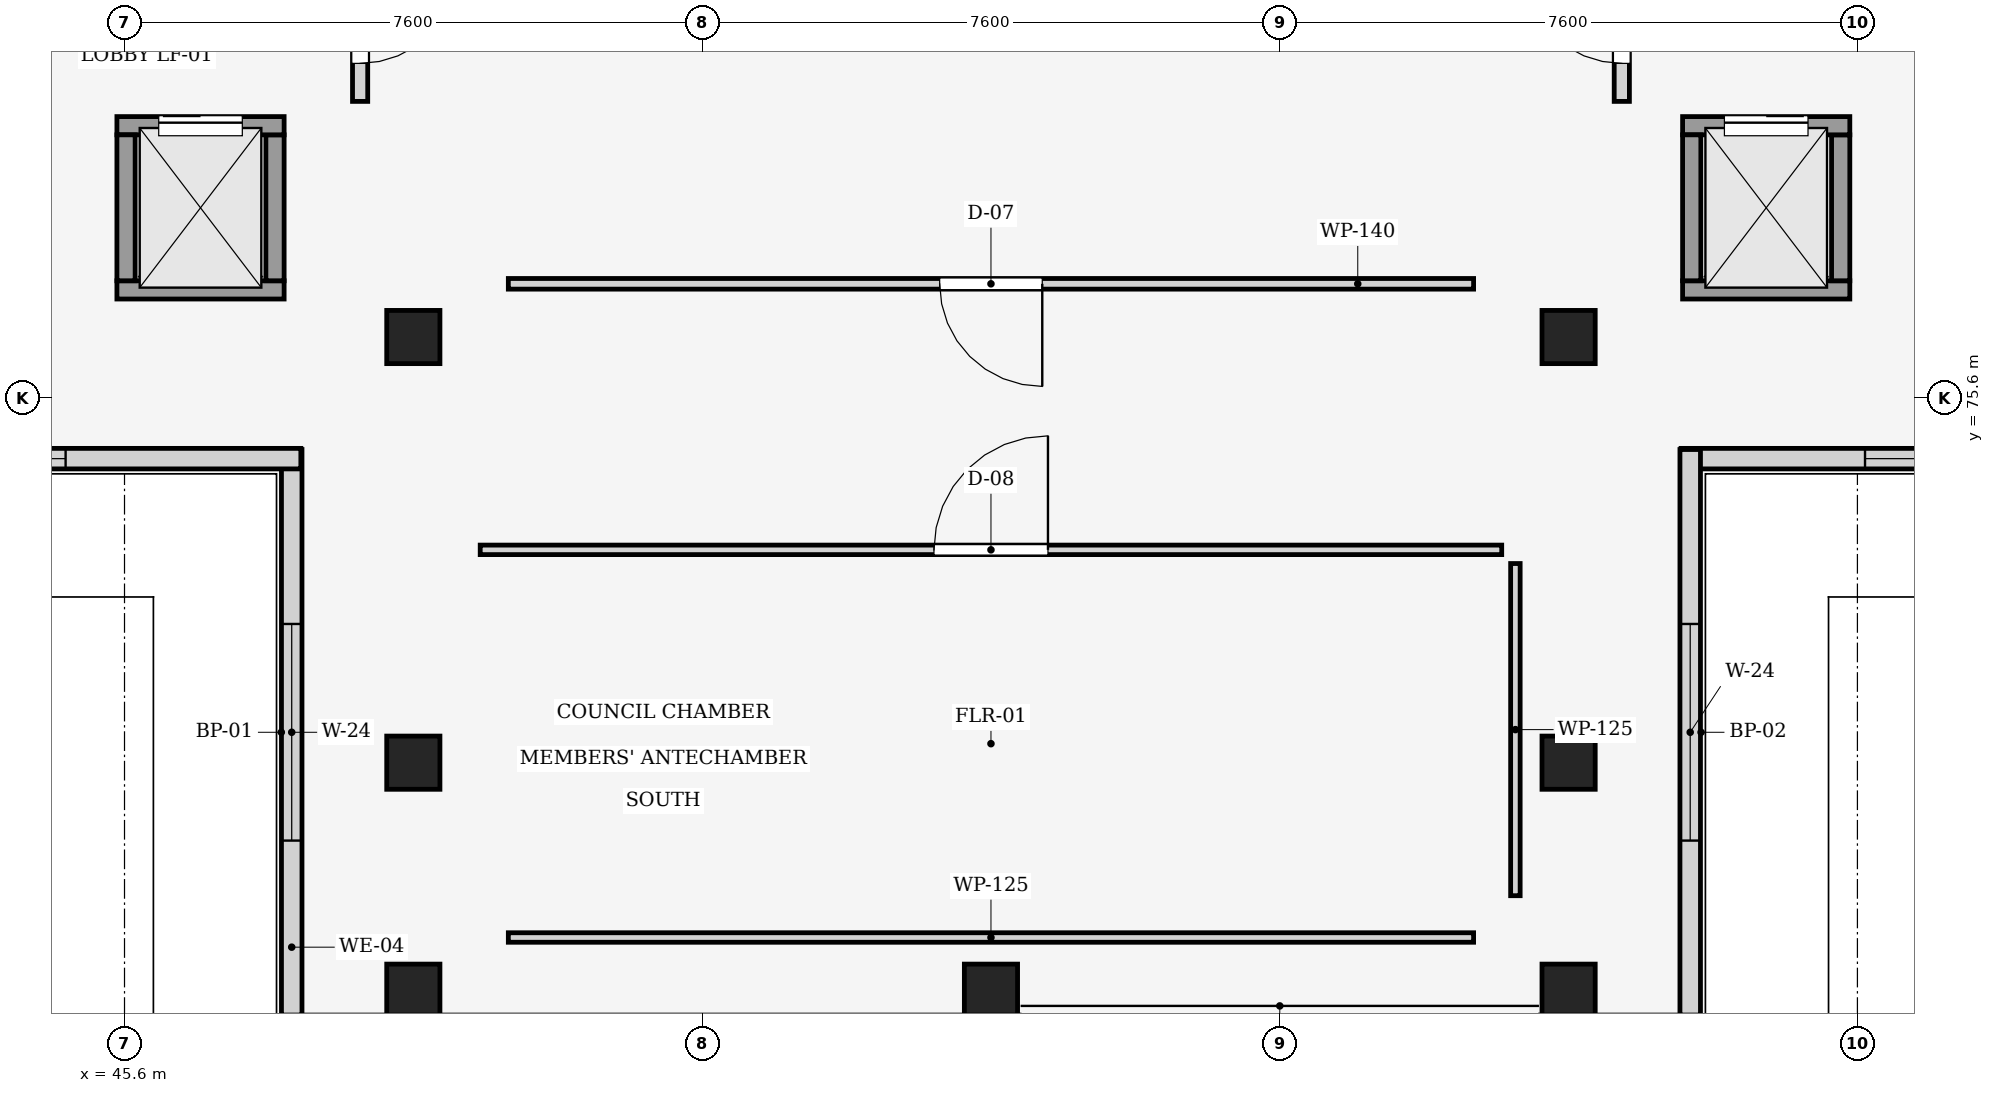
"""IFC4 building model, lengths in metres.
Left out: names, types, materials, properties, quantities, classifications, styles, units other than length and angle.
Written with IfcOpenShell. Run it as: python <this file> out.ifc"""

import sys

from ifc_helpers import new_model, si_unit, direction, frame, frame_2d, origin, origin_2d, place, context, subcontext, project, spatial, rectangle, extrude, element, fill, save


model = new_model("IFC4")
c1 = context("Model", 3, precision=1e-05, world=origin(), true_north=direction((0.0, 1.0)))
c2 = subcontext(c1, "Body", "Model", "MODEL_VIEW")
j1 = project(units=[si_unit("LENGTHUNIT", "METRE"), si_unit("PLANEANGLEUNIT", "RADIAN")], contexts=[c1])
p1 = place(None, origin())
s1 = spatial("IfcSite", under=j1, at=p1, CompositionType="ELEMENT")
p2 = place(p1, origin())
s2 = spatial("IfcBuilding", under=s1, at=p2, CompositionType="ELEMENT")
p3 = place(p2, frame((0.0, 0.0, 21.3)))
s3 = spatial("IfcBuildingStorey", under=s2, at=p3, CompositionType="ELEMENT", Elevation=21.3)
for number, where, z_axis, x_axis in (
    (1, (49.4, 70.8, 0.0), (0.0, 0.0, 1.0), (1.0, 0.0, 0.0)),
    (2, (49.4, 76.4, 0.0), (0.0, 0.0, 1.0), (1.0, 0.0, 0.0)),
    (3, (64.6, 70.8, 0.0), (0.0, 0.0, 1.0), (1.0, 0.0, 0.0)),
    (4, (64.6, 76.4, 0.0), (0.0, 0.0, 1.0), (1.0, 0.0, 0.0)),
    (5, (49.4, 67.8, 0.0), (0.0, 0.0, 1.0), (1.0, 0.0, 0.0)),
    (6, (57.0, 67.8, 0.0), (0.0, 0.0, 1.0), (1.0, 0.0, 0.0)),
    (7, (64.6, 67.8, 0.0), (0.0, 0.0, 1.0), (1.0, 0.0, 0.0)),
):
    element("IfcColumn", number, at=place(p3, frame(where, z_axis=z_axis, x_axis=x_axis)), inside=s3, PredefinedType="COLUMN", context=c2, shape_type="SweptSolid", body=[
        extrude(rectangle(XDim=0.7, YDim=0.7, at=origin_2d()), origin(), (0.0, 0.0, 1.0), 4.05),
    ])
p4 = place(p3, frame((47.8, 67.48, 0.0), z_axis=(0.0, 0.0, 1.0), x_axis=(0.0, 1.0, 0.0)))
e8 = element("IfcWall", 8, at=p4, inside=s3, PredefinedType="STANDARD", context=c2, shape_type="SweptSolid", body=[
    extrude(rectangle(XDim=7.44, YDim=0.27, at=frame_2d((3.72, 0.0))), origin(), (0.0, 0.0, 1.0), 3.015),
])
p5 = place(p4, frame((2.295, 0.0, 0.85)))
e9 = element("IfcOpeningElement", 9, at=p5, cuts=e8, PredefinedType="OPENING", context=c2, shape_type="SweptSolid", body=[
    extrude(rectangle(XDim=2.85, YDim=1.65, at=frame_2d((1.425, 0.825))), frame((0.0, 0.145, 0.0), z_axis=(0.0, -1.0, 0.0), x_axis=(1.0, 0.0, 0.0)), (0.0, 0.0, 1.0), 0.29),
])
p6 = place(p3, frame((47.92, 74.8, 0.0), z_axis=(0.0, 0.0, 1.0), x_axis=(-1.0, 0.0, 0.0)))
e10 = element("IfcWall", 10, at=p6, inside=s3, PredefinedType="STANDARD", context=c2, shape_type="SweptSolid", body=[
    extrude(rectangle(XDim=7.44, YDim=0.27, at=frame_2d((3.72, 0.0))), origin(), (0.0, 0.0, 1.0), 3.015),
])
p7 = place(p6, frame((3.095, 0.0, 0.85)))
e11 = element("IfcOpeningElement", 11, at=p7, cuts=e10, PredefinedType="OPENING", context=c2, shape_type="SweptSolid", body=[
    extrude(rectangle(XDim=1.25, YDim=1.85, at=frame_2d((0.625, 0.925))), frame((0.0, 0.145, 0.0), z_axis=(0.0, -1.0, 0.0), x_axis=(1.0, 0.0, 0.0)), (0.0, 0.0, 1.0), 0.29),
])
p8 = place(p3, frame((73.52, 74.8, 0.0), z_axis=(0.0, 0.0, 1.0), x_axis=(-1.0, 0.0, 0.0)))
e12 = element("IfcWall", 12, at=p8, inside=s3, PredefinedType="STANDARD", context=c2, shape_type="SweptSolid", body=[
    extrude(rectangle(XDim=7.44, YDim=0.27, at=frame_2d((3.72, 0.0))), origin(), (0.0, 0.0, 1.0), 3.015),
])
p9 = place(p8, frame((2.42, 0.0, 0.85)))
e13 = element("IfcOpeningElement", 13, at=p9, cuts=e12, PredefinedType="OPENING", context=c2, shape_type="SweptSolid", body=[
    extrude(rectangle(XDim=2.6, YDim=1.65, at=frame_2d((1.3, 0.825))), frame((0.0, 0.145, 0.0), z_axis=(0.0, -1.0, 0.0), x_axis=(1.0, 0.0, 0.0)), (0.0, 0.0, 1.0), 0.29),
])
p10 = place(p3, frame((66.2, 74.92, 0.0), z_axis=(0.0, 0.0, 1.0), x_axis=(0.0, -1.0, 0.0)))
e14 = element("IfcWall", 14, at=p10, inside=s3, PredefinedType="STANDARD", context=c2, shape_type="SweptSolid", body=[
    extrude(rectangle(XDim=7.44, YDim=0.27, at=frame_2d((3.72, 0.0))), origin(), (0.0, 0.0, 1.0), 3.015),
])
p11 = place(p10, frame((2.295, 0.0, 0.85)))
e15 = element("IfcOpeningElement", 15, at=p11, cuts=e14, PredefinedType="OPENING", context=c2, shape_type="SweptSolid", body=[
    extrude(rectangle(XDim=2.85, YDim=1.65, at=frame_2d((1.425, 0.825))), frame((0.0, 0.145, 0.0), z_axis=(0.0, -1.0, 0.0), x_axis=(1.0, 0.0, 0.0)), (0.0, 0.0, 1.0), 0.29),
])
p12 = place(p3, frame((47.7, 77.02, 0.0), z_axis=(0.0, 0.0, 1.0), x_axis=(-1.0, 0.0, 0.0)))
e16 = element("IfcWall", 16, at=p12, inside=s3, PredefinedType="SHEAR", context=c2, shape_type="SweptSolid", body=[
    extrude(rectangle(XDim=2.2, YDim=0.24, at=frame_2d((1.1, 0.0))), origin(), (0.0, 0.0, 1.0), 4.05),
])
p13 = place(p3, frame((47.58, 79.06, 0.0), z_axis=(0.0, 0.0, 1.0), x_axis=(0.0, -1.0, 0.0)))
e17 = element("IfcWall", 17, at=p13, inside=s3, PredefinedType="SHEAR", context=c2, shape_type="SweptSolid", body=[
    extrude(rectangle(XDim=1.92, YDim=0.24, at=frame_2d((0.96, 0.0))), origin(), (0.0, 0.0, 1.0), 4.05),
])
p14 = place(p3, frame((45.5, 79.18, 0.0), z_axis=(0.0, 0.0, 1.0), x_axis=(1.0, 0.0, 0.0)))
e18 = element("IfcWall", 18, at=p14, inside=s3, PredefinedType="SHEAR", context=c2, shape_type="SweptSolid", body=[
    extrude(rectangle(XDim=2.2, YDim=0.24, at=frame_2d((1.1, 0.0))), origin(), (0.0, 0.0, 1.0), 4.05),
])
p15 = place(p14, frame((0.55, 0.0, 0.0)))
e19 = element("IfcOpeningElement", 19, at=p15, cuts=e18, PredefinedType="OPENING", context=c2, shape_type="SweptSolid", body=[
    extrude(rectangle(XDim=1.1, YDim=2.15, at=frame_2d((0.55, 1.075))), frame((0.0, 0.13, 0.0), z_axis=(0.0, -1.0, 0.0), x_axis=(1.0, 0.0, 0.0)), (0.0, 0.0, 1.0), 0.26),
])
p16 = place(p3, frame((45.62, 77.14, 0.0), z_axis=(0.0, 0.0, 1.0), x_axis=(0.0, 1.0, 0.0)))
e20 = element("IfcWall", 20, at=p16, inside=s3, PredefinedType="SHEAR", context=c2, shape_type="SweptSolid", body=[
    extrude(rectangle(XDim=1.92, YDim=0.24, at=frame_2d((0.96, 0.0))), origin(), (0.0, 0.0, 1.0), 4.05),
])
p17 = place(p3, frame((48.7, 81.8, 0.0), z_axis=(0.0, 0.0, 1.0), x_axis=(0.0, -1.0, 0.0)))
e21 = element("IfcWall", 21, at=p17, inside=s3, PredefinedType="PARTITIONING", context=c2, shape_type="SweptSolid", body=[
    extrude(rectangle(XDim=2.3, YDim=0.2, at=frame_2d((1.15, 0.0))), origin(), (0.0, 0.0, 1.0), 2.9),
])
p18 = place(p17, frame((0.5, 0.0, 0.0)))
e22 = element("IfcOpeningElement", 22, at=p18, cuts=e21, PredefinedType="OPENING", context=c2, shape_type="SweptSolid", body=[
    extrude(rectangle(XDim=1.3, YDim=2.2, at=frame_2d((0.65, 1.1))), frame((0.0, 0.11, 0.0), z_axis=(0.0, -1.0, 0.0), x_axis=(1.0, 0.0, 0.0)), (0.0, 0.0, 1.0), 0.22),
])
p19 = place(p3, frame((68.3, 77.02, 0.0), z_axis=(0.0, 0.0, 1.0), x_axis=(-1.0, 0.0, 0.0)))
e23 = element("IfcWall", 23, at=p19, inside=s3, PredefinedType="SHEAR", context=c2, shape_type="SweptSolid", body=[
    extrude(rectangle(XDim=2.2, YDim=0.24, at=frame_2d((1.1, 0.0))), origin(), (0.0, 0.0, 1.0), 4.05),
])
p20 = place(p3, frame((68.18, 79.06, 0.0), z_axis=(0.0, 0.0, 1.0), x_axis=(0.0, -1.0, 0.0)))
e24 = element("IfcWall", 24, at=p20, inside=s3, PredefinedType="SHEAR", context=c2, shape_type="SweptSolid", body=[
    extrude(rectangle(XDim=1.92, YDim=0.24, at=frame_2d((0.96, 0.0))), origin(), (0.0, 0.0, 1.0), 4.05),
])
p21 = place(p3, frame((66.1, 79.18, 0.0), z_axis=(0.0, 0.0, 1.0), x_axis=(1.0, 0.0, 0.0)))
e25 = element("IfcWall", 25, at=p21, inside=s3, PredefinedType="SHEAR", context=c2, shape_type="SweptSolid", body=[
    extrude(rectangle(XDim=2.2, YDim=0.24, at=frame_2d((1.1, 0.0))), origin(), (0.0, 0.0, 1.0), 4.05),
])
p22 = place(p21, frame((0.55, 0.0, 0.0)))
e26 = element("IfcOpeningElement", 26, at=p22, cuts=e25, PredefinedType="OPENING", context=c2, shape_type="SweptSolid", body=[
    extrude(rectangle(XDim=1.1, YDim=2.15, at=frame_2d((0.55, 1.075))), frame((0.0, 0.13, 0.0), z_axis=(0.0, -1.0, 0.0), x_axis=(1.0, 0.0, 0.0)), (0.0, 0.0, 1.0), 0.26),
])
p23 = place(p3, frame((66.22, 77.14, 0.0), z_axis=(0.0, 0.0, 1.0), x_axis=(0.0, 1.0, 0.0)))
e27 = element("IfcWall", 27, at=p23, inside=s3, PredefinedType="SHEAR", context=c2, shape_type="SweptSolid", body=[
    extrude(rectangle(XDim=1.92, YDim=0.24, at=frame_2d((0.96, 0.0))), origin(), (0.0, 0.0, 1.0), 4.05),
])
p24 = place(p3, frame((65.3, 79.5, 0.0), z_axis=(0.0, 0.0, 1.0), x_axis=(0.0, 1.0, 0.0)))
e28 = element("IfcWall", 28, at=p24, inside=s3, PredefinedType="PARTITIONING", context=c2, shape_type="SweptSolid", body=[
    extrude(rectangle(XDim=2.3, YDim=0.2, at=frame_2d((1.15, 0.0))), origin(), (0.0, 0.0, 1.0), 2.9),
])
p25 = place(p24, frame((0.5, 0.0, 0.0)))
e29 = element("IfcOpeningElement", 29, at=p25, cuts=e28, PredefinedType="OPENING", context=c2, shape_type="SweptSolid", body=[
    extrude(rectangle(XDim=1.3, YDim=2.2, at=frame_2d((0.65, 1.1))), frame((0.0, 0.11, 0.0), z_axis=(0.0, -1.0, 0.0), x_axis=(1.0, 0.0, 0.0)), (0.0, 0.0, 1.0), 0.22),
])
p26 = place(p3, frame((63.35, 77.1, 0.0), z_axis=(0.0, 0.0, 1.0), x_axis=(-1.0, 0.0, 0.0)))
e30 = element("IfcWall", 30, at=p26, inside=s3, PredefinedType="PARTITIONING", context=c2, shape_type="SweptSolid", body=[
    extrude(rectangle(XDim=12.7, YDim=0.14, at=frame_2d((6.35, 0.0))), origin(), (0.0, 0.0, 1.0), 3.7),
])
p27 = place(p26, frame((5.675, 0.0, 0.0)))
e31 = element("IfcOpeningElement", 31, at=p27, cuts=e30, PredefinedType="OPENING", context=c2, shape_type="SweptSolid", body=[
    extrude(rectangle(XDim=1.35, YDim=2.1, at=frame_2d((0.675, 1.05))), frame((0.0, 0.08, 0.0), z_axis=(0.0, -1.0, 0.0), x_axis=(1.0, 0.0, 0.0)), (0.0, 0.0, 1.0), 0.16),
])
p28 = place(p3, frame((50.28, 73.6, 0.0), z_axis=(0.0, 0.0, 1.0), x_axis=(1.0, 0.0, 0.0)))
e32 = element("IfcWall", 32, at=p28, inside=s3, PredefinedType="PARTITIONING", context=c2, shape_type="SweptSolid", body=[
    extrude(rectangle(XDim=13.44, YDim=0.125, at=frame_2d((6.72, 0.0))), origin(), (0.0, 0.0, 1.0), 3.7),
])
p29 = place(p28, frame((5.97, 0.0, 0.0)))
e33 = element("IfcOpeningElement", 33, at=p29, cuts=e32, PredefinedType="OPENING", context=c2, shape_type="SweptSolid", body=[
    extrude(rectangle(XDim=1.5, YDim=2.1, at=frame_2d((0.75, 1.05))), frame((0.0, 0.073, 0.0), z_axis=(0.0, -1.0, 0.0), x_axis=(1.0, 0.0, 0.0)), (0.0, 0.0, 1.0), 0.145),
])
p30 = place(p3, frame((63.35, 68.5, 0.0), z_axis=(0.0, 0.0, 1.0), x_axis=(-1.0, 0.0, 0.0)))
e34 = element("IfcWall", 34, at=p30, inside=s3, PredefinedType="PARTITIONING", context=c2, shape_type="SweptSolid", body=[
    extrude(rectangle(XDim=12.7, YDim=0.125, at=frame_2d((6.35, 0.0))), origin(), (0.0, 0.0, 1.0), 3.7),
])
p31 = place(p3, frame((63.9, 73.42, 0.0), z_axis=(0.0, 0.0, 1.0), x_axis=(0.0, -1.0, 0.0)))
e35 = element("IfcWall", 35, at=p31, inside=s3, PredefinedType="PARTITIONING", context=c2, shape_type="SweptSolid", body=[
    extrude(rectangle(XDim=4.37, YDim=0.125, at=frame_2d((2.185, 0.0))), origin(), (0.0, 0.0, 1.0), 3.115),
])
p32 = place(p5, origin())
e36 = element("IfcWindow", 36, at=p32, inside=s3, PartitioningType="SINGLE_PANEL", PredefinedType="WINDOW", context=c2, shape_type="SweptSolid", body=[
    extrude(rectangle(XDim=2.85, YDim=1.65, at=frame_2d((1.425, 0.825))), frame((0.0, 0.03, 0.0), z_axis=(0.0, -1.0, 0.0), x_axis=(1.0, 0.0, 0.0)), (0.0, 0.0, 1.0), 0.06),
])
fill(e9, e36)
p33 = place(p7, origin())
e37 = element("IfcWindow", 37, at=p33, inside=s3, PartitioningType="SINGLE_PANEL", PredefinedType="WINDOW", context=c2, shape_type="SweptSolid", body=[
    extrude(rectangle(XDim=1.25, YDim=1.85, at=frame_2d((0.625, 0.925))), frame((0.0, 0.03, 0.0), z_axis=(0.0, -1.0, 0.0), x_axis=(1.0, 0.0, 0.0)), (0.0, 0.0, 1.0), 0.06),
])
fill(e11, e37)
p34 = place(p9, origin())
e38 = element("IfcWindow", 38, at=p34, inside=s3, PartitioningType="SINGLE_PANEL", PredefinedType="WINDOW", context=c2, shape_type="SweptSolid", body=[
    extrude(rectangle(XDim=2.6, YDim=1.65, at=frame_2d((1.3, 0.825))), frame((0.0, 0.03, 0.0), z_axis=(0.0, -1.0, 0.0), x_axis=(1.0, 0.0, 0.0)), (0.0, 0.0, 1.0), 0.06),
])
fill(e13, e38)
p35 = place(p11, origin())
e39 = element("IfcWindow", 39, at=p35, inside=s3, PartitioningType="SINGLE_PANEL", PredefinedType="WINDOW", context=c2, shape_type="SweptSolid", body=[
    extrude(rectangle(XDim=2.85, YDim=1.65, at=frame_2d((1.425, 0.825))), frame((0.0, 0.03, 0.0), z_axis=(0.0, -1.0, 0.0), x_axis=(1.0, 0.0, 0.0)), (0.0, 0.0, 1.0), 0.06),
])
fill(e15, e39)
p36 = place(p15, origin())
e40 = element("IfcDoor", 40, at=p36, inside=s3, OperationType="SLIDING_TO_LEFT", PredefinedType="DOOR", context=c2, shape_type="SweptSolid", body=[
    extrude(rectangle(XDim=1.1, YDim=2.15, at=frame_2d((0.55, 1.075))), frame((0.0, 0.025, 0.0), z_axis=(0.0, -1.0, 0.0), x_axis=(1.0, 0.0, 0.0)), (0.0, 0.0, 1.0), 0.05),
])
fill(e19, e40)
p37 = place(p18, origin())
e41 = element("IfcDoor", 41, at=p37, inside=s3, OperationType="SINGLE_SWING_LEFT", PredefinedType="DOOR", context=c2, shape_type="SweptSolid", body=[
    extrude(rectangle(XDim=1.3, YDim=2.2, at=frame_2d((0.65, 1.1))), frame((0.0, 0.025, 0.0), z_axis=(0.0, -1.0, 0.0), x_axis=(1.0, 0.0, 0.0)), (0.0, 0.0, 1.0), 0.05),
])
fill(e22, e41)
p38 = place(p22, origin())
e42 = element("IfcDoor", 42, at=p38, inside=s3, OperationType="SLIDING_TO_RIGHT", PredefinedType="DOOR", context=c2, shape_type="SweptSolid", body=[
    extrude(rectangle(XDim=1.1, YDim=2.15, at=frame_2d((0.55, 1.075))), frame((0.0, 0.025, 0.0), z_axis=(0.0, -1.0, 0.0), x_axis=(1.0, 0.0, 0.0)), (0.0, 0.0, 1.0), 0.05),
])
fill(e26, e42)
p39 = place(p25, origin())
e43 = element("IfcDoor", 43, at=p39, inside=s3, OperationType="SINGLE_SWING_RIGHT", PredefinedType="DOOR", context=c2, shape_type="SweptSolid", body=[
    extrude(rectangle(XDim=1.3, YDim=2.2, at=frame_2d((0.65, 1.1))), frame((0.0, 0.025, 0.0), z_axis=(0.0, -1.0, 0.0), x_axis=(1.0, 0.0, 0.0)), (0.0, 0.0, 1.0), 0.05),
])
fill(e29, e43)
p40 = place(p27, origin())
e44 = element("IfcDoor", 44, at=p40, inside=s3, OperationType="SINGLE_SWING_LEFT", PredefinedType="DOOR", context=c2, shape_type="SweptSolid", body=[
    extrude(rectangle(XDim=1.35, YDim=2.1, at=frame_2d((0.675, 1.05))), frame((0.0, 0.025, 0.0), z_axis=(0.0, -1.0, 0.0), x_axis=(1.0, 0.0, 0.0)), (0.0, 0.0, 1.0), 0.05),
])
fill(e31, e44)
p41 = place(p29, origin())
e45 = element("IfcDoor", 45, at=p41, inside=s3, OperationType="SINGLE_SWING_RIGHT", PredefinedType="DOOR", context=c2, shape_type="SweptSolid", body=[
    extrude(rectangle(XDim=1.5, YDim=2.1, at=frame_2d((0.75, 1.05))), frame((0.0, 0.025, 0.0), z_axis=(0.0, -1.0, 0.0), x_axis=(1.0, 0.0, 0.0)), (0.0, 0.0, 1.0), 0.05),
])
fill(e33, e45)
save(model, sys.argv[1])
